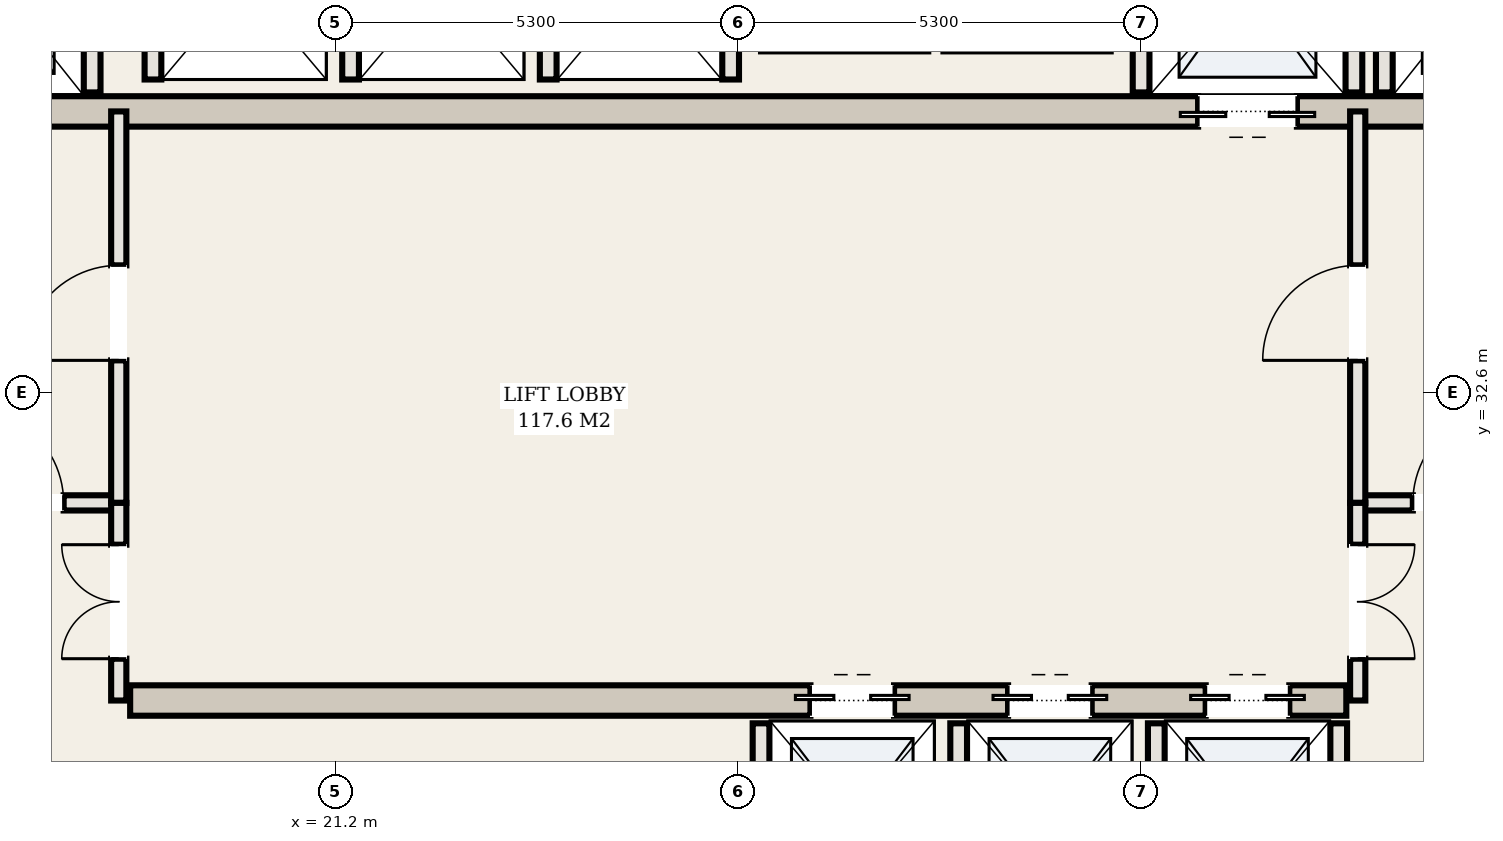
"""IFC4 building model, lengths in metres.
Left out: names, types, materials, properties, quantities, classifications, styles, units other than length and angle.
Written with IfcOpenShell. Run it as: python <this file> out.ifc"""

import sys

from ifc_helpers import new_model, si_unit, direction, frame, frame_2d, origin, place, context, subcontext, project, spatial, rectangle, extrude, element, fill, save


model = new_model("IFC4")
c1 = context("Model", 3, precision=1e-05, world=origin(), true_north=direction((0.0, 1.0)))
c2 = subcontext(c1, "Body", "Model", "MODEL_VIEW")
j1 = project(units=[si_unit("LENGTHUNIT", "METRE"), si_unit("PLANEANGLEUNIT", "RADIAN")], contexts=[c1])
p1 = place(None, origin())
s1 = spatial("IfcSite", under=j1, at=p1, CompositionType="ELEMENT")
p2 = place(p1, origin())
s2 = spatial("IfcBuilding", under=s1, at=p2, CompositionType="ELEMENT")
p3 = place(p2, frame((0.0, 0.0, 185.4)))
s3 = spatial("IfcBuildingStorey", under=s2, at=p3, CompositionType="ELEMENT", Elevation=185.4)
p4 = place(p3, frame((15.5, 36.3, 0.0), z_axis=(0.0, 0.0, 1.0), x_axis=(1.0, 0.0, 0.0)))
e1 = element("IfcWall", 1, at=p4, inside=s3, PredefinedType="SHEAR", context=c2, shape_type="SweptSolid", body=[
    extrude(rectangle(XDim=22.0, YDim=0.4, at=frame_2d((11.0, 0.0))), origin(), (0.0, 0.0, 1.0), 6.56),
])
p5 = place(p4, frame((0.65, 0.0, 0.0)))
e2 = element("IfcOpeningElement", 2, at=p5, cuts=e1, PredefinedType="OPENING", context=c2, shape_type="SweptSolid", body=[
    extrude(rectangle(XDim=1.1, YDim=2.15, at=frame_2d((0.55, 1.075))), frame((0.0, 0.21, 0.0), z_axis=(0.0, -1.0, 0.0), x_axis=(1.0, 0.0, 0.0)), (0.0, 0.0, 1.0), 0.42),
])
p6 = place(p4, frame((20.25, 0.0, 0.0)))
e3 = element("IfcOpeningElement", 3, at=p6, cuts=e1, PredefinedType="OPENING", context=c2, shape_type="SweptSolid", body=[
    extrude(rectangle(XDim=1.1, YDim=2.15, at=frame_2d((0.55, 1.075))), frame((0.0, 0.21, 0.0), z_axis=(0.0, -1.0, 0.0), x_axis=(1.0, 0.0, 0.0)), (0.0, 0.0, 1.0), 0.42),
])
p7 = place(p4, frame((17.05, 0.0, 0.0)))
e4 = element("IfcOpeningElement", 4, at=p7, cuts=e1, PredefinedType="OPENING", context=c2, shape_type="SweptSolid", body=[
    extrude(rectangle(XDim=1.3, YDim=2.2, at=frame_2d((0.65, 1.1))), frame((0.0, 0.21, 0.0), z_axis=(0.0, -1.0, 0.0), x_axis=(1.0, 0.0, 0.0)), (0.0, 0.0, 1.0), 0.42),
])
p8 = place(p3, frame((18.5, 28.55, 0.0), z_axis=(0.0, 0.0, 1.0), x_axis=(1.0, 0.0, 0.0)))
e5 = element("IfcWall", 5, at=p8, inside=s3, PredefinedType="SHEAR", context=c2, shape_type="SweptSolid", body=[
    extrude(rectangle(XDim=16.0, YDim=0.4, at=frame_2d((8.0, 0.0))), origin(), (0.0, 0.0, 1.0), 6.56),
])
p9 = place(p8, frame((8.95, 0.0, 0.0)))
e6 = element("IfcOpeningElement", 6, at=p9, cuts=e5, PredefinedType="OPENING", context=c2, shape_type="SweptSolid", body=[
    extrude(rectangle(XDim=1.1, YDim=2.15, at=frame_2d((0.55, 1.075))), frame((0.0, 0.21, 0.0), z_axis=(0.0, -1.0, 0.0), x_axis=(1.0, 0.0, 0.0)), (0.0, 0.0, 1.0), 0.42),
])
p10 = place(p8, frame((11.55, 0.0, 0.0)))
e7 = element("IfcOpeningElement", 7, at=p10, cuts=e5, PredefinedType="OPENING", context=c2, shape_type="SweptSolid", body=[
    extrude(rectangle(XDim=1.1, YDim=2.15, at=frame_2d((0.55, 1.075))), frame((0.0, 0.21, 0.0), z_axis=(0.0, -1.0, 0.0), x_axis=(1.0, 0.0, 0.0)), (0.0, 0.0, 1.0), 0.42),
])
p11 = place(p8, frame((14.15, 0.0, 0.0)))
e8 = element("IfcOpeningElement", 8, at=p11, cuts=e5, PredefinedType="OPENING", context=c2, shape_type="SweptSolid", body=[
    extrude(rectangle(XDim=1.1, YDim=2.15, at=frame_2d((0.55, 1.075))), frame((0.0, 0.21, 0.0), z_axis=(0.0, -1.0, 0.0), x_axis=(1.0, 0.0, 0.0)), (0.0, 0.0, 1.0), 0.42),
])
for number, where, z_axis, x_axis in (
    (9, (18.0, 36.55, 0.0), (0.0, 0.0, 1.0), (0.0, 1.0, 0.0)),
    (10, (35.0, 36.55, 0.0), (0.0, 0.0, 1.0), (0.0, 1.0, 0.0)),
    (11, (31.8, 36.55, 0.0), (0.0, 0.0, 1.0), (0.0, 1.0, 0.0)),
    (12, (34.6, 36.55, 0.0), (0.0, 0.0, 1.0), (0.0, 1.0, 0.0)),
):
    element("IfcWall", number, at=place(p3, frame(where, z_axis=z_axis, x_axis=x_axis)), inside=s3, PredefinedType="SOLIDWALL", context=c2, shape_type="SweptSolid", body=[
        extrude(rectangle(XDim=2.93, YDim=0.22, at=frame_2d((1.465, 0.0))), origin(), (0.0, 0.0, 1.0), 6.56),
    ])
for number, where, z_axis, x_axis in (
    (13, (26.8, 25.72, 0.0), (0.0, 0.0, 1.0), (0.0, 1.0, 0.0)),
    (14, (29.4, 25.72, 0.0), (0.0, 0.0, 1.0), (0.0, 1.0, 0.0)),
    (15, (32.0, 25.72, 0.0), (0.0, 0.0, 1.0), (0.0, 1.0, 0.0)),
    (16, (34.4, 25.72, 0.0), (0.0, 0.0, 1.0), (0.0, 1.0, 0.0)),
):
    element("IfcWall", number, at=place(p3, frame(where, z_axis=z_axis, x_axis=x_axis)), inside=s3, PredefinedType="SOLIDWALL", context=c2, shape_type="SweptSolid", body=[
        extrude(rectangle(XDim=2.53, YDim=0.22, at=frame_2d((1.265, 0.0))), origin(), (0.0, 0.0, 1.0), 6.56),
    ])
for number, where, z_axis, x_axis in (
    (17, (18.8, 36.72, 0.0), (0.0, 0.0, 1.0), (0.0, 1.0, 0.0)),
    (18, (21.4, 36.72, 0.0), (0.0, 0.0, 1.0), (0.0, 1.0, 0.0)),
    (19, (24.0, 36.72, 0.0), (0.0, 0.0, 1.0), (0.0, 1.0, 0.0)),
    (20, (26.4, 36.72, 0.0), (0.0, 0.0, 1.0), (0.0, 1.0, 0.0)),
):
    element("IfcWall", number, at=place(p3, frame(where, z_axis=z_axis, x_axis=x_axis)), inside=s3, PredefinedType="SOLIDWALL", context=c2, shape_type="SweptSolid", body=[
        extrude(rectangle(XDim=2.56, YDim=0.22, at=frame_2d((1.28, 0.0))), origin(), (0.0, 0.0, 1.0), 6.56),
    ])
p12 = place(p3, frame((15.1, 31.15, 0.0), z_axis=(0.0, 0.0, 1.0), x_axis=(1.0, 0.0, 0.0)))
e21 = element("IfcWall", 21, at=p12, inside=s3, PredefinedType="PARTITIONING", context=c2, shape_type="SweptSolid", body=[
    extrude(rectangle(XDim=3.25, YDim=0.2, at=frame_2d((1.625, 0.0))), origin(), (0.0, 0.0, 1.0), 6.56),
])
p13 = place(p12, frame((1.275, 0.0, 0.0)))
e22 = element("IfcOpeningElement", 22, at=p13, cuts=e21, PredefinedType="OPENING", context=c2, shape_type="SweptSolid", body=[
    extrude(rectangle(XDim=1.25, YDim=2.2, at=frame_2d((0.625, 1.1))), frame((0.0, 0.11, 0.0), z_axis=(0.0, -1.0, 0.0), x_axis=(1.0, 0.0, 0.0)), (0.0, 0.0, 1.0), 0.22),
])
p14 = place(p3, frame((18.35, 31.15, 0.0), z_axis=(0.0, 0.0, 1.0), x_axis=(0.0, 1.0, 0.0)))
e23 = element("IfcWall", 23, at=p14, inside=s3, PredefinedType="PARTITIONING", context=c2, shape_type="SweptSolid", body=[
    extrude(rectangle(XDim=5.15, YDim=0.2, at=frame_2d((2.575, 0.0))), origin(), (0.0, 0.0, 1.0), 6.56),
])
p15 = place(p14, frame((1.875, 0.0, 0.0)))
e24 = element("IfcOpeningElement", 24, at=p15, cuts=e23, PredefinedType="OPENING", context=c2, shape_type="SweptSolid", body=[
    extrude(rectangle(XDim=1.25, YDim=2.2, at=frame_2d((0.625, 1.1))), frame((0.0, 0.11, 0.0), z_axis=(0.0, -1.0, 0.0), x_axis=(1.0, 0.0, 0.0)), (0.0, 0.0, 1.0), 0.22),
])
p16 = place(p3, frame((34.65, 31.15, 0.0), z_axis=(0.0, 0.0, 1.0), x_axis=(1.0, 0.0, 0.0)))
e25 = element("IfcWall", 25, at=p16, inside=s3, PredefinedType="PARTITIONING", context=c2, shape_type="SweptSolid", body=[
    extrude(rectangle(XDim=3.25, YDim=0.2, at=frame_2d((1.625, 0.0))), origin(), (0.0, 0.0, 1.0), 6.56),
])
p17 = place(p16, frame((0.725, 0.0, 0.0)))
e26 = element("IfcOpeningElement", 26, at=p17, cuts=e25, PredefinedType="OPENING", context=c2, shape_type="SweptSolid", body=[
    extrude(rectangle(XDim=1.25, YDim=2.2, at=frame_2d((0.625, 1.1))), frame((0.0, 0.11, 0.0), z_axis=(0.0, -1.0, 0.0), x_axis=(1.0, 0.0, 0.0)), (0.0, 0.0, 1.0), 0.22),
])
p18 = place(p3, frame((34.65, 31.15, 0.0), z_axis=(0.0, 0.0, 1.0), x_axis=(0.0, 1.0, 0.0)))
e27 = element("IfcWall", 27, at=p18, inside=s3, PredefinedType="PARTITIONING", context=c2, shape_type="SweptSolid", body=[
    extrude(rectangle(XDim=5.15, YDim=0.2, at=frame_2d((2.575, 0.0))), origin(), (0.0, 0.0, 1.0), 6.56),
])
p19 = place(p18, frame((1.875, 0.0, 0.0)))
e28 = element("IfcOpeningElement", 28, at=p19, cuts=e27, PredefinedType="OPENING", context=c2, shape_type="SweptSolid", body=[
    extrude(rectangle(XDim=1.25, YDim=2.2, at=frame_2d((0.625, 1.1))), frame((0.0, 0.11, 0.0), z_axis=(0.0, -1.0, 0.0), x_axis=(1.0, 0.0, 0.0)), (0.0, 0.0, 1.0), 0.22),
])
p20 = place(p3, frame((18.35, 28.55, 0.0), z_axis=(0.0, 0.0, 1.0), x_axis=(0.0, 1.0, 0.0)))
e29 = element("IfcWall", 29, at=p20, inside=s3, PredefinedType="PARTITIONING", context=c2, shape_type="SweptSolid", body=[
    extrude(rectangle(XDim=2.6, YDim=0.2, at=frame_2d((1.3, 0.0))), origin(), (0.0, 0.0, 1.0), 6.56),
])
p21 = place(p20, frame((0.55, 0.0, 0.0)))
e30 = element("IfcOpeningElement", 30, at=p21, cuts=e29, PredefinedType="OPENING", context=c2, shape_type="SweptSolid", body=[
    extrude(rectangle(XDim=1.5, YDim=2.25, at=frame_2d((0.75, 1.125))), frame((0.0, 0.11, 0.0), z_axis=(0.0, -1.0, 0.0), x_axis=(1.0, 0.0, 0.0)), (0.0, 0.0, 1.0), 0.22),
])
p22 = place(p3, frame((34.65, 28.55, 0.0), z_axis=(0.0, 0.0, 1.0), x_axis=(0.0, 1.0, 0.0)))
e31 = element("IfcWall", 31, at=p22, inside=s3, PredefinedType="PARTITIONING", context=c2, shape_type="SweptSolid", body=[
    extrude(rectangle(XDim=2.6, YDim=0.2, at=frame_2d((1.3, 0.0))), origin(), (0.0, 0.0, 1.0), 6.56),
])
p23 = place(p22, frame((0.55, 0.0, 0.0)))
e32 = element("IfcOpeningElement", 32, at=p23, cuts=e31, PredefinedType="OPENING", context=c2, shape_type="SweptSolid", body=[
    extrude(rectangle(XDim=1.5, YDim=2.25, at=frame_2d((0.75, 1.125))), frame((0.0, 0.11, 0.0), z_axis=(0.0, -1.0, 0.0), x_axis=(1.0, 0.0, 0.0)), (0.0, 0.0, 1.0), 0.22),
])
p24 = place(p7, frame((1.3, 0.0, 0.0), z_axis=(0.0, 0.0, 1.0), x_axis=(-1.0, 0.0, 0.0)))
e33 = element("IfcDoor", 33, at=p24, inside=s3, OperationType="DOUBLE_DOOR_SLIDING", PredefinedType="DOOR", context=c2, shape_type="SweptSolid", body=[
    extrude(rectangle(XDim=1.3, YDim=2.2, at=frame_2d((0.65, 1.1))), frame((0.0, 0.025, 0.0), z_axis=(0.0, -1.0, 0.0), x_axis=(1.0, 0.0, 0.0)), (0.0, 0.0, 1.0), 0.05),
])
fill(e4, e33)
p25 = place(p9, origin())
e34 = element("IfcDoor", 34, at=p25, inside=s3, OperationType="DOUBLE_DOOR_SLIDING", PredefinedType="DOOR", context=c2, shape_type="SweptSolid", body=[
    extrude(rectangle(XDim=1.1, YDim=2.15, at=frame_2d((0.55, 1.075))), frame((0.0, 0.025, 0.0), z_axis=(0.0, -1.0, 0.0), x_axis=(1.0, 0.0, 0.0)), (0.0, 0.0, 1.0), 0.05),
])
fill(e6, e34)
p26 = place(p10, origin())
e35 = element("IfcDoor", 35, at=p26, inside=s3, OperationType="DOUBLE_DOOR_SLIDING", PredefinedType="DOOR", context=c2, shape_type="SweptSolid", body=[
    extrude(rectangle(XDim=1.1, YDim=2.15, at=frame_2d((0.55, 1.075))), frame((0.0, 0.025, 0.0), z_axis=(0.0, -1.0, 0.0), x_axis=(1.0, 0.0, 0.0)), (0.0, 0.0, 1.0), 0.05),
])
fill(e7, e35)
p27 = place(p11, origin())
e36 = element("IfcDoor", 36, at=p27, inside=s3, OperationType="DOUBLE_DOOR_SLIDING", PredefinedType="DOOR", context=c2, shape_type="SweptSolid", body=[
    extrude(rectangle(XDim=1.1, YDim=2.15, at=frame_2d((0.55, 1.075))), frame((0.0, 0.025, 0.0), z_axis=(0.0, -1.0, 0.0), x_axis=(1.0, 0.0, 0.0)), (0.0, 0.0, 1.0), 0.05),
])
fill(e8, e36)
p28 = place(p13, origin())
e37 = element("IfcDoor", 37, at=p28, inside=s3, OperationType="SINGLE_SWING_LEFT", PredefinedType="DOOR", context=c2, shape_type="SweptSolid", body=[
    extrude(rectangle(XDim=1.25, YDim=2.2, at=frame_2d((0.625, 1.1))), frame((0.0, 0.025, 0.0), z_axis=(0.0, -1.0, 0.0), x_axis=(1.0, 0.0, 0.0)), (0.0, 0.0, 1.0), 0.05),
])
fill(e22, e37)
p29 = place(p15, origin())
e38 = element("IfcDoor", 38, at=p29, inside=s3, OperationType="SINGLE_SWING_LEFT", PredefinedType="DOOR", context=c2, shape_type="SweptSolid", body=[
    extrude(rectangle(XDim=1.25, YDim=2.2, at=frame_2d((0.625, 1.1))), frame((0.0, 0.025, 0.0), z_axis=(0.0, -1.0, 0.0), x_axis=(1.0, 0.0, 0.0)), (0.0, 0.0, 1.0), 0.05),
])
fill(e24, e38)
p30 = place(p17, origin())
e39 = element("IfcDoor", 39, at=p30, inside=s3, OperationType="SINGLE_SWING_RIGHT", PredefinedType="DOOR", context=c2, shape_type="SweptSolid", body=[
    extrude(rectangle(XDim=1.25, YDim=2.2, at=frame_2d((0.625, 1.1))), frame((0.0, 0.025, 0.0), z_axis=(0.0, -1.0, 0.0), x_axis=(1.0, 0.0, 0.0)), (0.0, 0.0, 1.0), 0.05),
])
fill(e26, e39)
p31 = place(p19, origin())
e40 = element("IfcDoor", 40, at=p31, inside=s3, OperationType="SINGLE_SWING_LEFT", PredefinedType="DOOR", context=c2, shape_type="SweptSolid", body=[
    extrude(rectangle(XDim=1.25, YDim=2.2, at=frame_2d((0.625, 1.1))), frame((0.0, 0.025, 0.0), z_axis=(0.0, -1.0, 0.0), x_axis=(1.0, 0.0, 0.0)), (0.0, 0.0, 1.0), 0.05),
])
fill(e28, e40)
p32 = place(p21, origin())
e41 = element("IfcDoor", 41, at=p32, inside=s3, OperationType="DOUBLE_DOOR_SINGLE_SWING", PredefinedType="DOOR", context=c2, shape_type="SweptSolid", body=[
    extrude(rectangle(XDim=1.5, YDim=2.25, at=frame_2d((0.75, 1.125))), frame((0.0, 0.025, 0.0), z_axis=(0.0, -1.0, 0.0), x_axis=(1.0, 0.0, 0.0)), (0.0, 0.0, 1.0), 0.05),
])
fill(e30, e41)
p33 = place(p23, frame((1.5, 0.0, 0.0), z_axis=(0.0, 0.0, 1.0), x_axis=(-1.0, 0.0, 0.0)))
e42 = element("IfcDoor", 42, at=p33, inside=s3, OperationType="DOUBLE_DOOR_SINGLE_SWING", PredefinedType="DOOR", context=c2, shape_type="SweptSolid", body=[
    extrude(rectangle(XDim=1.5, YDim=2.25, at=frame_2d((0.75, 1.125))), frame((0.0, 0.025, 0.0), z_axis=(0.0, -1.0, 0.0), x_axis=(1.0, 0.0, 0.0)), (0.0, 0.0, 1.0), 0.05),
])
fill(e32, e42)
save(model, sys.argv[1])
